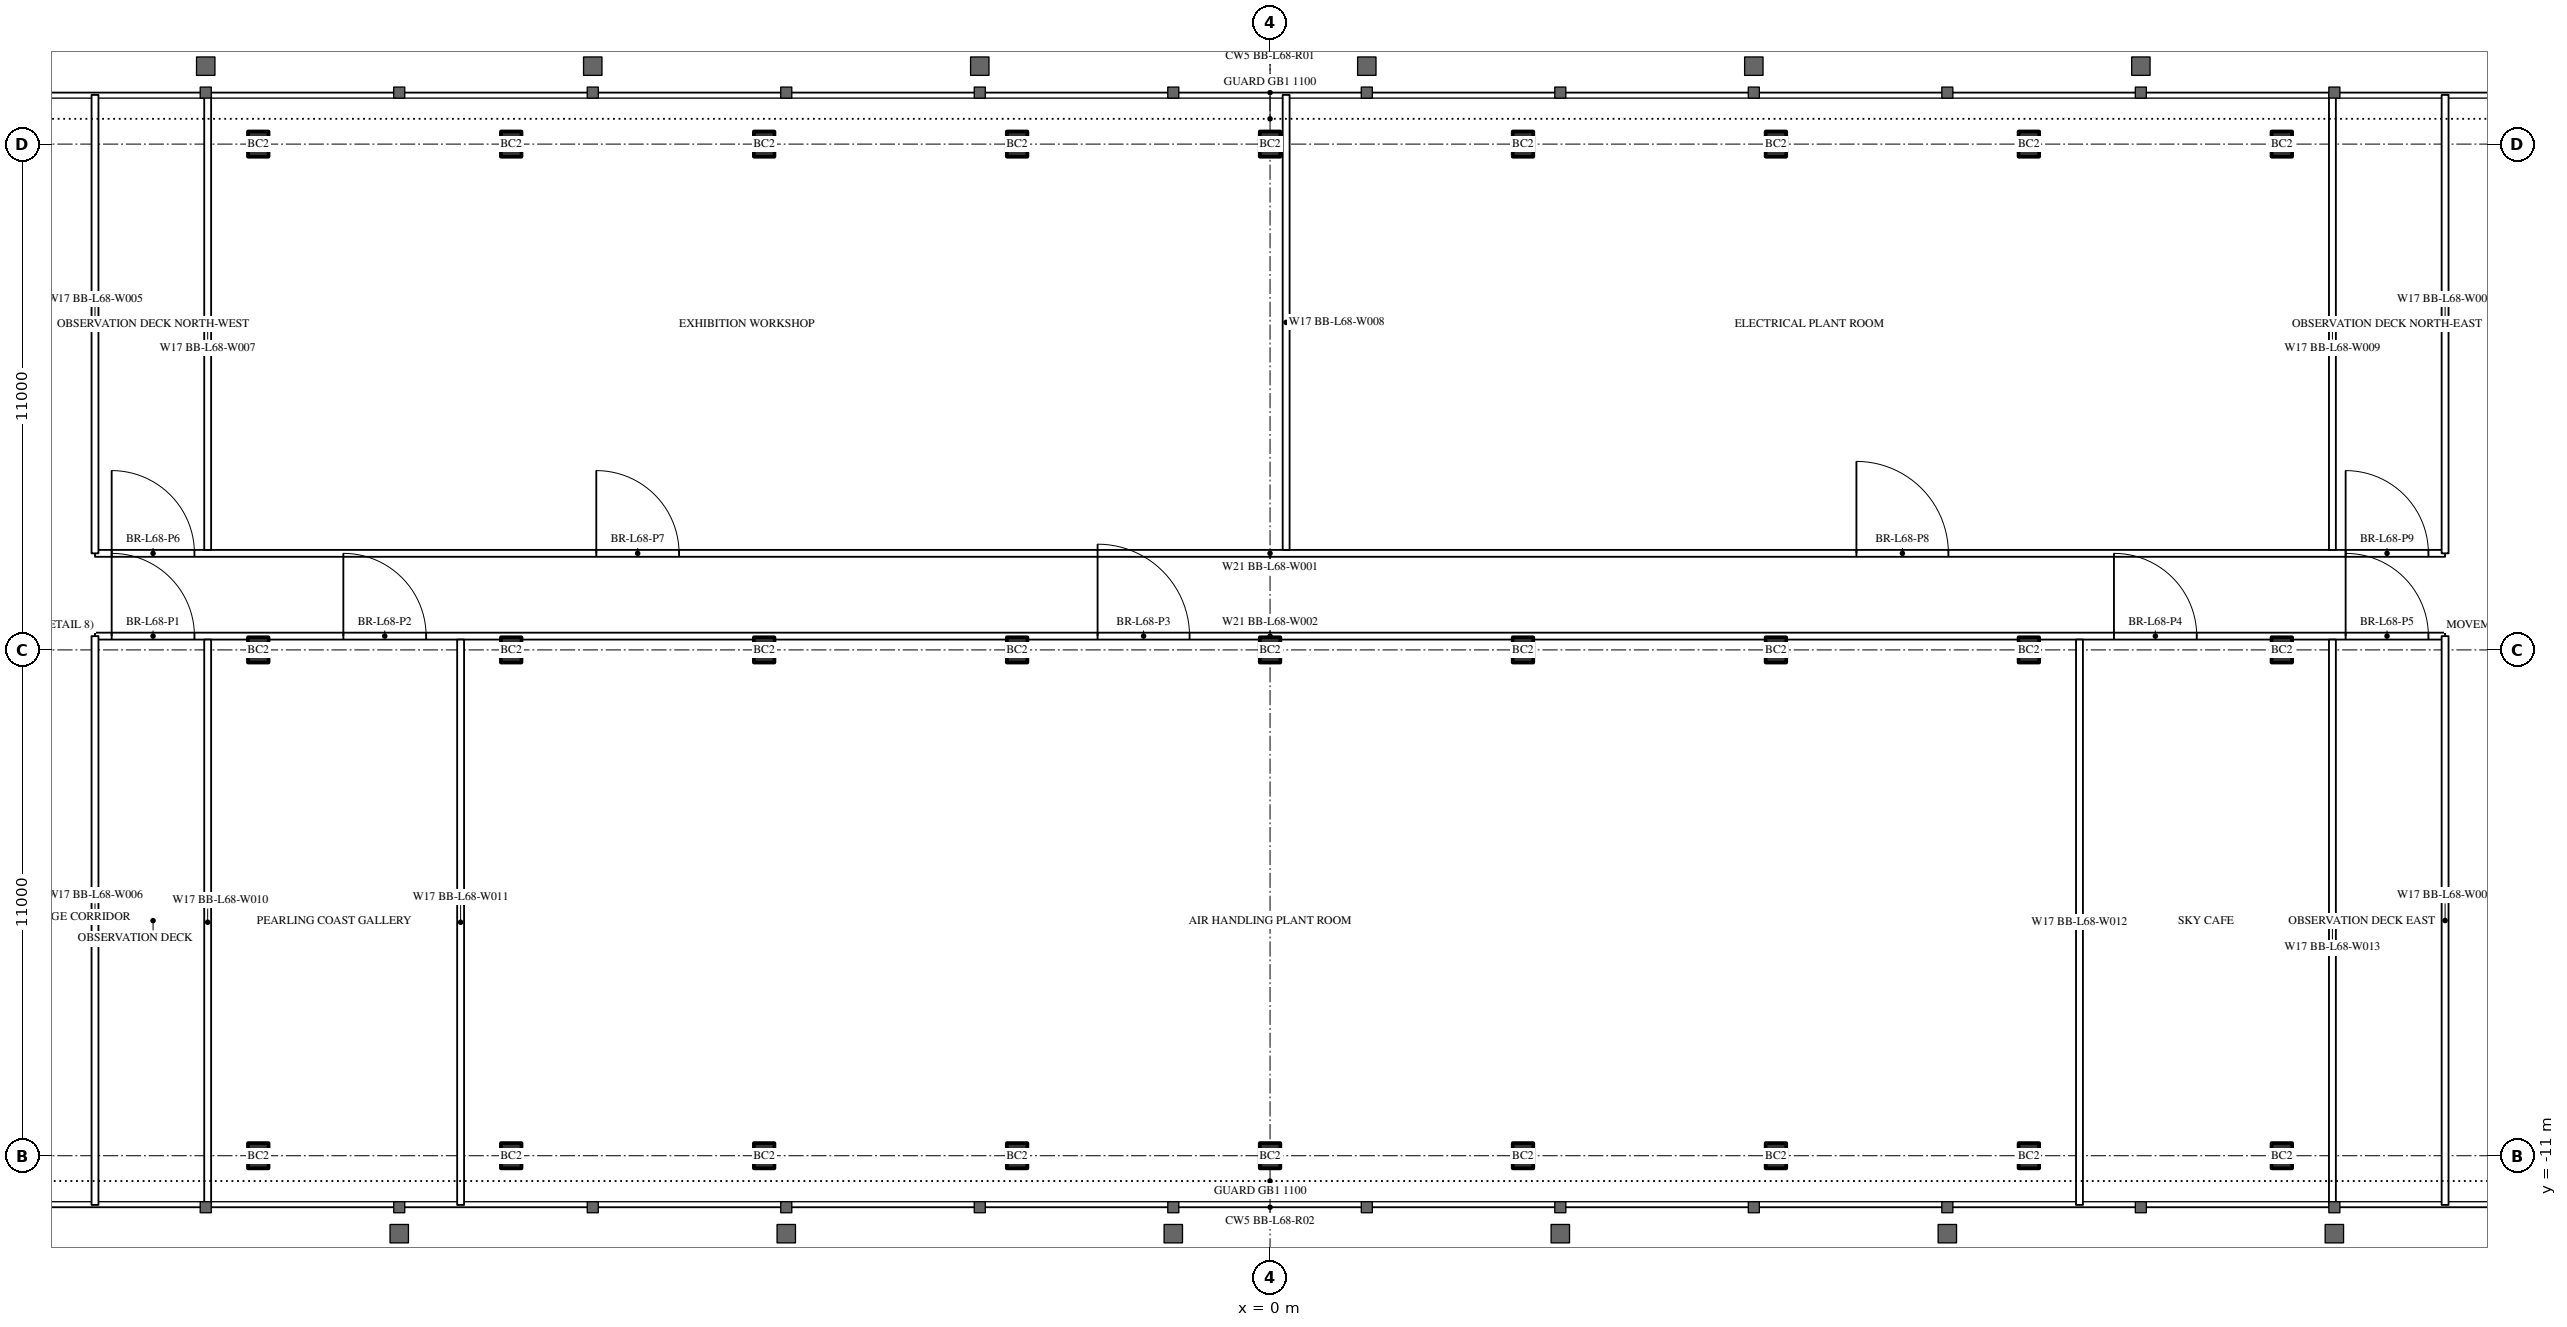
"""IFC4 building model, lengths in metres.
Left out: names, types, materials, properties, quantities, classifications, styles, units other than length and angle.
Written with IfcOpenShell. Run it as: python <this file> out.ifc"""

import sys

from ifc_helpers import new_model, si_unit, direction, frame, frame_2d, origin, origin_2d, place, context, subcontext, project, spatial, rectangle, i_section, extrude, element, fill, save


model = new_model("IFC4")
c1 = context("Model", 3, precision=1e-05, world=origin(), true_north=direction((0.0, 1.0)))
c2 = subcontext(c1, "Body", "Model", "MODEL_VIEW")
j1 = project(units=[si_unit("LENGTHUNIT", "METRE"), si_unit("PLANEANGLEUNIT", "RADIAN")], contexts=[c1])
p1 = place(None, origin())
s1 = spatial("IfcSite", under=j1, at=p1, CompositionType="ELEMENT")
p2 = place(p1, origin())
s2 = spatial("IfcBuilding", under=s1, at=p2, CompositionType="ELEMENT")
p3 = place(p2, frame((0.0, 0.0, 257.3)))
s3 = spatial("IfcBuildingStorey", under=s2, at=p3, CompositionType="ELEMENT", Elevation=257.3)
for number, where, z_axis, x_axis in (
    (1, (-22.0, -11.0, 0.0), (0.0, 0.0, 1.0), (1.0, 0.0, 0.0)),
    (2, (-16.5, -11.0, 0.0), (0.0, 0.0, 1.0), (1.0, 0.0, 0.0)),
    (3, (-11.0, -11.0, 0.0), (0.0, 0.0, 1.0), (1.0, 0.0, 0.0)),
    (4, (-5.5, -11.0, 0.0), (0.0, 0.0, 1.0), (1.0, 0.0, 0.0)),
    (5, (0.0, -11.0, 0.0), (0.0, 0.0, 1.0), (1.0, 0.0, 0.0)),
    (6, (5.5, -11.0, 0.0), (0.0, 0.0, 1.0), (1.0, 0.0, 0.0)),
    (7, (11.0, -11.0, 0.0), (0.0, 0.0, 1.0), (1.0, 0.0, 0.0)),
    (8, (16.5, -11.0, 0.0), (0.0, 0.0, 1.0), (1.0, 0.0, 0.0)),
    (9, (22.0, -11.0, 0.0), (0.0, 0.0, 1.0), (1.0, 0.0, 0.0)),
    (10, (-22.0, 0.0, 0.0), (0.0, 0.0, 1.0), (1.0, 0.0, 0.0)),
    (11, (-16.5, 0.0, 0.0), (0.0, 0.0, 1.0), (1.0, 0.0, 0.0)),
    (12, (-11.0, 0.0, 0.0), (0.0, 0.0, 1.0), (1.0, 0.0, 0.0)),
    (13, (-5.5, 0.0, 0.0), (0.0, 0.0, 1.0), (1.0, 0.0, 0.0)),
    (14, (0.0, 0.0, 0.0), (0.0, 0.0, 1.0), (1.0, 0.0, 0.0)),
    (15, (5.5, 0.0, 0.0), (0.0, 0.0, 1.0), (1.0, 0.0, 0.0)),
    (16, (11.0, 0.0, 0.0), (0.0, 0.0, 1.0), (1.0, 0.0, 0.0)),
    (17, (16.5, 0.0, 0.0), (0.0, 0.0, 1.0), (1.0, 0.0, 0.0)),
    (18, (22.0, 0.0, 0.0), (0.0, 0.0, 1.0), (1.0, 0.0, 0.0)),
    (19, (-22.0, 11.0, 0.0), (0.0, 0.0, 1.0), (1.0, 0.0, 0.0)),
    (20, (-16.5, 11.0, 0.0), (0.0, 0.0, 1.0), (1.0, 0.0, 0.0)),
    (21, (-11.0, 11.0, 0.0), (0.0, 0.0, 1.0), (1.0, 0.0, 0.0)),
    (22, (-5.5, 11.0, 0.0), (0.0, 0.0, 1.0), (1.0, 0.0, 0.0)),
    (23, (0.0, 11.0, 0.0), (0.0, 0.0, 1.0), (1.0, 0.0, 0.0)),
    (24, (5.5, 11.0, 0.0), (0.0, 0.0, 1.0), (1.0, 0.0, 0.0)),
    (25, (11.0, 11.0, 0.0), (0.0, 0.0, 1.0), (1.0, 0.0, 0.0)),
    (26, (16.5, 11.0, 0.0), (0.0, 0.0, 1.0), (1.0, 0.0, 0.0)),
    (27, (22.0, 11.0, 0.0), (0.0, 0.0, 1.0), (1.0, 0.0, 0.0)),
):
    element("IfcColumn", number, at=place(p3, frame(where, z_axis=z_axis, x_axis=x_axis)), inside=s3, PredefinedType="COLUMN", context=c2, shape_type="SweptSolid", body=[
        extrude(i_section(OverallWidth=0.448, OverallDepth=0.55, WebThickness=0.072, FlangeThickness=0.115, FilletRadius=0.02, at=origin_2d()), origin(), (0.0, 0.0, 1.0), 6.0),
    ])
p4 = place(p3, frame((-25.55, 0.3, 0.0), z_axis=(0.0, 0.0, 1.0), x_axis=(1.0, 0.0, 0.0)))
e28 = element("IfcWall", 28, at=p4, inside=s3, PredefinedType="PARTITIONING", context=c2, shape_type="SweptSolid", body=[
    extrude(rectangle(XDim=51.1, YDim=0.15, at=frame_2d((25.55, 0.0))), origin(), (0.0, 0.0, 1.0), 4.8),
])
p5 = place(p4, frame((0.363, 0.0, 0.0)))
e29 = element("IfcOpeningElement", 29, at=p5, cuts=e28, PredefinedType="OPENING", context=c2, shape_type="SweptSolid", body=[
    extrude(rectangle(XDim=1.8, YDim=2.2, at=frame_2d((0.9, 1.1))), frame((0.0, 0.085, 0.0), z_axis=(0.0, -1.0, 0.0), x_axis=(1.0, 0.0, 0.0)), (0.0, 0.0, 1.0), 0.17),
])
p6 = place(p4, frame((5.4, 0.0, 0.0)))
e30 = element("IfcOpeningElement", 30, at=p6, cuts=e28, PredefinedType="OPENING", context=c2, shape_type="SweptSolid", body=[
    extrude(rectangle(XDim=1.8, YDim=2.2, at=frame_2d((0.9, 1.1))), frame((0.0, 0.085, 0.0), z_axis=(0.0, -1.0, 0.0), x_axis=(1.0, 0.0, 0.0)), (0.0, 0.0, 1.0), 0.17),
])
p7 = place(p4, frame((21.8, 0.0, 0.0)))
e31 = element("IfcOpeningElement", 31, at=p7, cuts=e28, PredefinedType="OPENING", context=c2, shape_type="SweptSolid", body=[
    extrude(rectangle(XDim=2.0, YDim=2.4, at=frame_2d((1.0, 1.2))), frame((0.0, 0.085, 0.0), z_axis=(0.0, -1.0, 0.0), x_axis=(1.0, 0.0, 0.0)), (0.0, 0.0, 1.0), 0.17),
])
p8 = place(p4, frame((43.9, 0.0, 0.0)))
e32 = element("IfcOpeningElement", 32, at=p8, cuts=e28, PredefinedType="OPENING", context=c2, shape_type="SweptSolid", body=[
    extrude(rectangle(XDim=1.8, YDim=2.2, at=frame_2d((0.9, 1.1))), frame((0.0, 0.085, 0.0), z_axis=(0.0, -1.0, 0.0), x_axis=(1.0, 0.0, 0.0)), (0.0, 0.0, 1.0), 0.17),
])
p9 = place(p4, frame((48.938, 0.0, 0.0)))
e33 = element("IfcOpeningElement", 33, at=p9, cuts=e28, PredefinedType="OPENING", context=c2, shape_type="SweptSolid", body=[
    extrude(rectangle(XDim=1.8, YDim=2.2, at=frame_2d((0.9, 1.1))), frame((0.0, 0.085, 0.0), z_axis=(0.0, -1.0, 0.0), x_axis=(1.0, 0.0, 0.0)), (0.0, 0.0, 1.0), 0.17),
])
p10 = place(p3, frame((-25.55, 2.1, 0.0), z_axis=(0.0, 0.0, 1.0), x_axis=(1.0, 0.0, 0.0)))
e34 = element("IfcWall", 34, at=p10, inside=s3, PredefinedType="PARTITIONING", context=c2, shape_type="SweptSolid", body=[
    extrude(rectangle(XDim=51.1, YDim=0.15, at=frame_2d((25.55, 0.0))), origin(), (0.0, 0.0, 1.0), 5.8),
])
p11 = place(p10, frame((0.363, 0.0, 0.0)))
e35 = element("IfcOpeningElement", 35, at=p11, cuts=e34, PredefinedType="OPENING", context=c2, shape_type="SweptSolid", body=[
    extrude(rectangle(XDim=1.8, YDim=2.2, at=frame_2d((0.9, 1.1))), frame((0.0, 0.085, 0.0), z_axis=(0.0, -1.0, 0.0), x_axis=(1.0, 0.0, 0.0)), (0.0, 0.0, 1.0), 0.17),
])
p12 = place(p10, frame((10.9, 0.0, 0.0)))
e36 = element("IfcOpeningElement", 36, at=p12, cuts=e34, PredefinedType="OPENING", context=c2, shape_type="SweptSolid", body=[
    extrude(rectangle(XDim=1.8, YDim=2.2, at=frame_2d((0.9, 1.1))), frame((0.0, 0.085, 0.0), z_axis=(0.0, -1.0, 0.0), x_axis=(1.0, 0.0, 0.0)), (0.0, 0.0, 1.0), 0.17),
])
p13 = place(p10, frame((38.3, 0.0, 0.0)))
e37 = element("IfcOpeningElement", 37, at=p13, cuts=e34, PredefinedType="OPENING", context=c2, shape_type="SweptSolid", body=[
    extrude(rectangle(XDim=2.0, YDim=2.4, at=frame_2d((1.0, 1.2))), frame((0.0, 0.085, 0.0), z_axis=(0.0, -1.0, 0.0), x_axis=(1.0, 0.0, 0.0)), (0.0, 0.0, 1.0), 0.17),
])
p14 = place(p10, frame((48.938, 0.0, 0.0)))
e38 = element("IfcOpeningElement", 38, at=p14, cuts=e34, PredefinedType="OPENING", context=c2, shape_type="SweptSolid", body=[
    extrude(rectangle(XDim=1.8, YDim=2.2, at=frame_2d((0.9, 1.1))), frame((0.0, 0.085, 0.0), z_axis=(0.0, -1.0, 0.0), x_axis=(1.0, 0.0, 0.0)), (0.0, 0.0, 1.0), 0.17),
])
p15 = place(p3, frame((-25.55, -12.07, 0.0), z_axis=(0.0, 0.0, 1.0), x_axis=(0.0, 1.0, 0.0)))
e39 = element("IfcWall", 39, at=p15, inside=s3, PredefinedType="PARTITIONING", context=c2, shape_type="SweptSolid", body=[
    extrude(rectangle(XDim=12.37, YDim=0.15, at=frame_2d((6.185, 0.0))), origin(), (0.0, 0.0, 1.0), 5.8),
])
p16 = place(p3, frame((-25.55, 2.1, 0.0), z_axis=(0.0, 0.0, 1.0), x_axis=(0.0, 1.0, 0.0)))
e40 = element("IfcWall", 40, at=p16, inside=s3, PredefinedType="PARTITIONING", context=c2, shape_type="SweptSolid", body=[
    extrude(rectangle(XDim=9.97, YDim=0.15, at=frame_2d((4.985, 0.0))), origin(), (0.0, 0.0, 1.0), 5.8),
])
p17 = place(p3, frame((25.55, -12.07, 0.0), z_axis=(0.0, 0.0, 1.0), x_axis=(0.0, 1.0, 0.0)))
e41 = element("IfcWall", 41, at=p17, inside=s3, PredefinedType="PARTITIONING", context=c2, shape_type="SweptSolid", body=[
    extrude(rectangle(XDim=12.37, YDim=0.15, at=frame_2d((6.185, 0.0))), origin(), (0.0, 0.0, 1.0), 5.8),
])
p18 = place(p3, frame((25.55, 2.1, 0.0), z_axis=(0.0, 0.0, 1.0), x_axis=(0.0, 1.0, 0.0)))
e42 = element("IfcWall", 42, at=p18, inside=s3, PredefinedType="PARTITIONING", context=c2, shape_type="SweptSolid", body=[
    extrude(rectangle(XDim=9.97, YDim=0.15, at=frame_2d((4.985, 0.0))), origin(), (0.0, 0.0, 1.0), 5.8),
])
for number, where, z_axis, x_axis in (
    (43, (-23.1, -12.07, 0.0), (0.0, 0.0, 1.0), (0.0, 1.0, 0.0)),
    (44, (-17.6, -12.07, 0.0), (0.0, 0.0, 1.0), (0.0, 1.0, 0.0)),
    (45, (17.6, -12.07, 0.0), (0.0, 0.0, 1.0), (0.0, 1.0, 0.0)),
    (46, (23.1, -12.07, 0.0), (0.0, 0.0, 1.0), (0.0, 1.0, 0.0)),
):
    element("IfcWall", number, at=place(p3, frame(where, z_axis=z_axis, x_axis=x_axis)), inside=s3, PredefinedType="PARTITIONING", context=c2, shape_type="SweptSolid", body=[
        extrude(rectangle(XDim=12.295, YDim=0.15, at=frame_2d((6.147, 0.0))), origin(), (0.0, 0.0, 1.0), 5.8),
    ])
for number, where, z_axis, x_axis in (
    (47, (-23.1, 2.175, 0.0), (0.0, 0.0, 1.0), (0.0, 1.0, 0.0)),
    (48, (0.35, 2.175, 0.0), (0.0, 0.0, 1.0), (0.0, 1.0, 0.0)),
    (49, (23.1, 2.175, 0.0), (0.0, 0.0, 1.0), (0.0, 1.0, 0.0)),
):
    element("IfcWall", number, at=place(p3, frame(where, z_axis=z_axis, x_axis=x_axis)), inside=s3, PredefinedType="PARTITIONING", context=c2, shape_type="SweptSolid", body=[
        extrude(rectangle(XDim=9.895, YDim=0.15, at=frame_2d((4.948, 0.0))), origin(), (0.0, 0.0, 1.0), 5.8),
    ])
p19 = place(p5, origin())
e50 = element("IfcDoor", 50, at=p19, inside=s3, OperationType="DOUBLE_DOOR_SINGLE_SWING", PredefinedType="DOOR", context=c2, shape_type="SweptSolid", body=[
    extrude(rectangle(XDim=1.8, YDim=2.2, at=frame_2d((0.9, 1.1))), frame((0.0, 0.025, 0.0), z_axis=(0.0, -1.0, 0.0), x_axis=(1.0, 0.0, 0.0)), (0.0, 0.0, 1.0), 0.05),
])
fill(e29, e50)
p20 = place(p6, origin())
e51 = element("IfcDoor", 51, at=p20, inside=s3, OperationType="DOUBLE_DOOR_SINGLE_SWING", PredefinedType="DOOR", context=c2, shape_type="SweptSolid", body=[
    extrude(rectangle(XDim=1.8, YDim=2.2, at=frame_2d((0.9, 1.1))), frame((0.0, 0.025, 0.0), z_axis=(0.0, -1.0, 0.0), x_axis=(1.0, 0.0, 0.0)), (0.0, 0.0, 1.0), 0.05),
])
fill(e30, e51)
p21 = place(p7, origin())
e52 = element("IfcDoor", 52, at=p21, inside=s3, OperationType="DOUBLE_DOOR_SINGLE_SWING", PredefinedType="DOOR", context=c2, shape_type="SweptSolid", body=[
    extrude(rectangle(XDim=2.0, YDim=2.4, at=frame_2d((1.0, 1.2))), frame((0.0, 0.025, 0.0), z_axis=(0.0, -1.0, 0.0), x_axis=(1.0, 0.0, 0.0)), (0.0, 0.0, 1.0), 0.05),
])
fill(e31, e52)
p22 = place(p8, origin())
e53 = element("IfcDoor", 53, at=p22, inside=s3, OperationType="DOUBLE_DOOR_SINGLE_SWING", PredefinedType="DOOR", context=c2, shape_type="SweptSolid", body=[
    extrude(rectangle(XDim=1.8, YDim=2.2, at=frame_2d((0.9, 1.1))), frame((0.0, 0.025, 0.0), z_axis=(0.0, -1.0, 0.0), x_axis=(1.0, 0.0, 0.0)), (0.0, 0.0, 1.0), 0.05),
])
fill(e32, e53)
p23 = place(p9, origin())
e54 = element("IfcDoor", 54, at=p23, inside=s3, OperationType="DOUBLE_DOOR_SINGLE_SWING", PredefinedType="DOOR", context=c2, shape_type="SweptSolid", body=[
    extrude(rectangle(XDim=1.8, YDim=2.2, at=frame_2d((0.9, 1.1))), frame((0.0, 0.025, 0.0), z_axis=(0.0, -1.0, 0.0), x_axis=(1.0, 0.0, 0.0)), (0.0, 0.0, 1.0), 0.05),
])
fill(e33, e54)
p24 = place(p11, origin())
e55 = element("IfcDoor", 55, at=p24, inside=s3, OperationType="DOUBLE_DOOR_SINGLE_SWING", PredefinedType="DOOR", context=c2, shape_type="SweptSolid", body=[
    extrude(rectangle(XDim=1.8, YDim=2.2, at=frame_2d((0.9, 1.1))), frame((0.0, 0.025, 0.0), z_axis=(0.0, -1.0, 0.0), x_axis=(1.0, 0.0, 0.0)), (0.0, 0.0, 1.0), 0.05),
])
fill(e35, e55)
p25 = place(p12, origin())
e56 = element("IfcDoor", 56, at=p25, inside=s3, OperationType="DOUBLE_DOOR_SINGLE_SWING", PredefinedType="DOOR", context=c2, shape_type="SweptSolid", body=[
    extrude(rectangle(XDim=1.8, YDim=2.2, at=frame_2d((0.9, 1.1))), frame((0.0, 0.025, 0.0), z_axis=(0.0, -1.0, 0.0), x_axis=(1.0, 0.0, 0.0)), (0.0, 0.0, 1.0), 0.05),
])
fill(e36, e56)
p26 = place(p13, origin())
e57 = element("IfcDoor", 57, at=p26, inside=s3, OperationType="DOUBLE_DOOR_SINGLE_SWING", PredefinedType="DOOR", context=c2, shape_type="SweptSolid", body=[
    extrude(rectangle(XDim=2.0, YDim=2.4, at=frame_2d((1.0, 1.2))), frame((0.0, 0.025, 0.0), z_axis=(0.0, -1.0, 0.0), x_axis=(1.0, 0.0, 0.0)), (0.0, 0.0, 1.0), 0.05),
])
fill(e37, e57)
p27 = place(p14, origin())
e58 = element("IfcDoor", 58, at=p27, inside=s3, OperationType="DOUBLE_DOOR_SINGLE_SWING", PredefinedType="DOOR", context=c2, shape_type="SweptSolid", body=[
    extrude(rectangle(XDim=1.8, YDim=2.2, at=frame_2d((0.9, 1.1))), frame((0.0, 0.025, 0.0), z_axis=(0.0, -1.0, 0.0), x_axis=(1.0, 0.0, 0.0)), (0.0, 0.0, 1.0), 0.05),
])
fill(e38, e58)
save(model, sys.argv[1])
